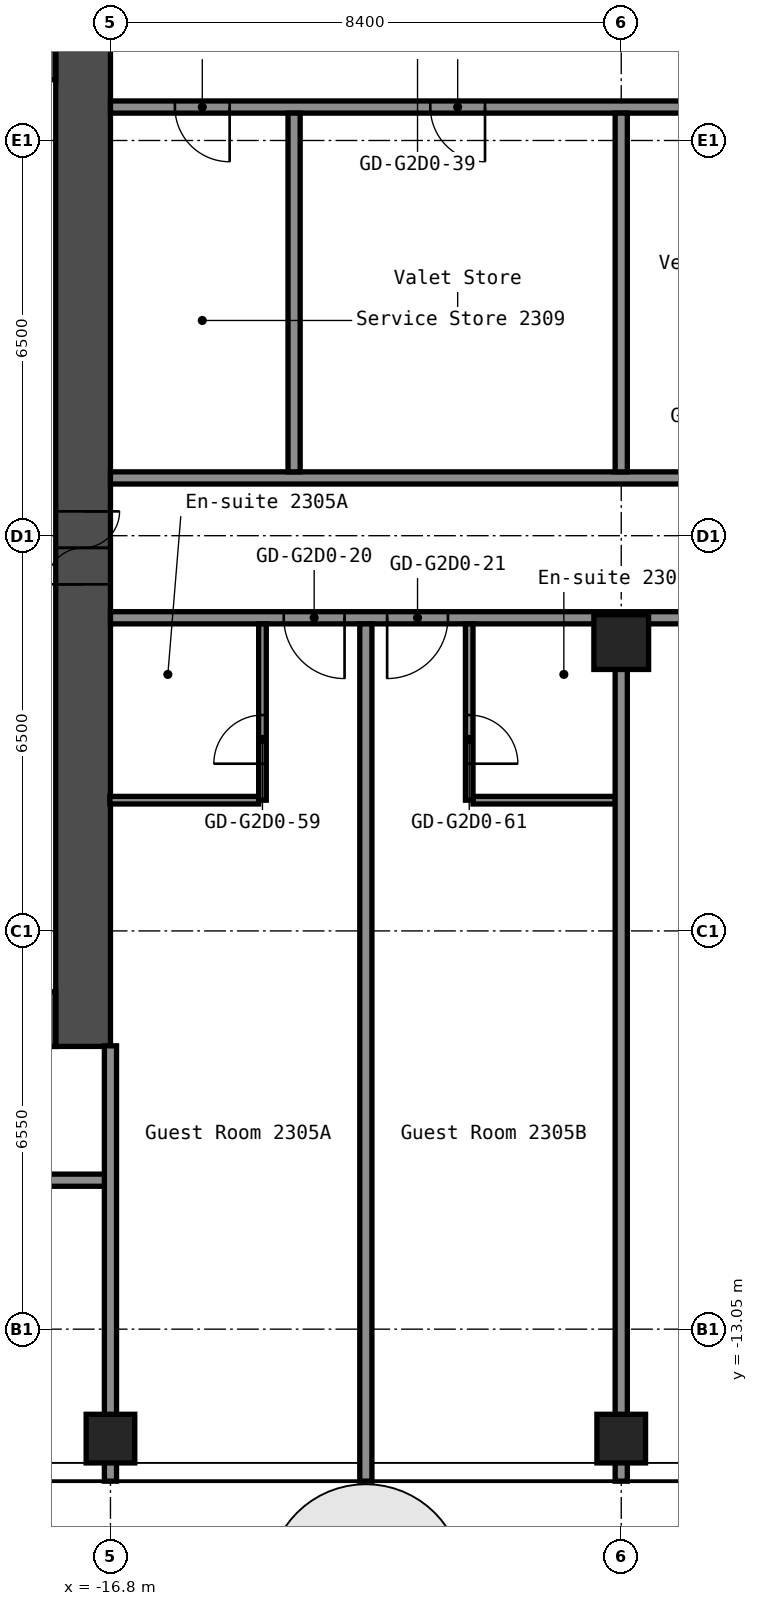
"""IFC4 building model, lengths in metres.
Left out: names, types, materials, properties, quantities, classifications, styles, units other than length and angle.
Written with IfcOpenShell. Run it as: python <this file> out.ifc"""

import sys

from ifc_helpers import new_model, si_unit, direction, frame, frame_2d, origin, origin_2d, place, context, subcontext, project, spatial, rectangle, hollow_rectangle, extrude, element, fill, save


model = new_model("IFC4")
c1 = context("Model", 3, precision=1e-05, world=origin(), true_north=direction((0.0, 1.0)))
c2 = subcontext(c1, "Body", "Model", "MODEL_VIEW")
j1 = project(units=[si_unit("LENGTHUNIT", "METRE"), si_unit("PLANEANGLEUNIT", "RADIAN")], contexts=[c1])
p1 = place(None, origin())
s1 = spatial("IfcSite", under=j1, at=p1, CompositionType="ELEMENT")
p2 = place(p1, origin())
s2 = spatial("IfcBuilding", under=s1, at=p2, CompositionType="ELEMENT")
p3 = place(p2, frame((0.0, 0.0, 85.0)))
s3 = spatial("IfcBuildingStorey", under=s2, at=p3, CompositionType="ELEMENT", Elevation=85.0)
for number, where, z_axis, x_axis in (
    (1, (-16.8, -14.85, 0.0), (0.0, 0.0, 1.0), (1.0, 0.0, 0.0)),
    (2, (-8.4, -14.85, 0.0), (0.0, 0.0, 1.0), (1.0, 0.0, 0.0)),
):
    element("IfcColumn", number, at=place(p3, frame(where, z_axis=z_axis, x_axis=x_axis)), inside=s3, PredefinedType="COLUMN", context=c2, shape_type="SweptSolid", body=[
        extrude(hollow_rectangle(XDim=0.8, YDim=0.8, WallThickness=0.032, at=origin_2d()), origin(), (0.0, 0.0, 1.0), 2.8),
    ])
p4 = place(p3, frame((-8.4, -1.75, 0.0), z_axis=(0.0, 0.0, 1.0), x_axis=(1.0, 0.0, 0.0)))
e3 = element("IfcColumn", 3, at=p4, inside=s3, PredefinedType="COLUMN", context=c2, shape_type="SweptSolid", body=[
    extrude(hollow_rectangle(XDim=0.9, YDim=0.9, WallThickness=0.036, at=origin_2d()), origin(), (0.0, 0.0, 1.0), 2.8),
])
p5 = place(p3, frame((-17.25, -8.4, 0.0), z_axis=(0.0, 0.0, 1.0), x_axis=(0.0, 1.0, 0.0)))
e4 = element("IfcWall", 4, at=p5, inside=s3, PredefinedType="SHEAR", context=c2, shape_type="SweptSolid", body=[
    extrude(rectangle(XDim=16.8, YDim=0.9, at=frame_2d((8.4, 0.0))), origin(), (0.0, 0.0, 1.0), 2.8),
])
p6 = place(p5, frame((7.6, 0.0, 0.0)))
e5 = element("IfcOpeningElement", 5, at=p6, cuts=e4, PredefinedType="OPENING", context=c2, shape_type="SweptSolid", body=[
    extrude(rectangle(XDim=1.2, YDim=2.1, at=frame_2d((0.6, 1.05))), frame((0.0, 0.46, 0.0), z_axis=(0.0, -1.0, 0.0), x_axis=(1.0, 0.0, 0.0)), (0.0, 0.0, 1.0), 0.92),
])
p7 = place(p3, frame((-32.7, 7.95, 0.0), z_axis=(0.0, 0.0, 1.0), x_axis=(1.0, 0.0, 0.0)))
e6 = element("IfcWall", 6, at=p7, inside=s3, PredefinedType="SHEAR", context=c2, shape_type="SweptSolid", body=[
    extrude(rectangle(XDim=15.0, YDim=0.9, at=frame_2d((7.5, 0.0))), origin(), (0.0, 0.0, 1.0), 2.8),
])
p8 = place(p7, frame((3.4, 0.0, 0.0)))
e7 = element("IfcOpeningElement", 7, at=p8, cuts=e6, PredefinedType="OPENING", context=c2, shape_type="SweptSolid", body=[
    extrude(rectangle(XDim=1.2, YDim=2.1, at=frame_2d((0.6, 1.05))), frame((0.0, 0.46, 0.0), z_axis=(0.0, -1.0, 0.0), x_axis=(1.0, 0.0, 0.0)), (0.0, 0.0, 1.0), 0.92),
])
p9 = place(p7, frame((0.75, 0.0, 0.0)))
e8 = element("IfcOpeningElement", 8, at=p9, cuts=e6, PredefinedType="OPENING", context=c2, shape_type="SweptSolid", body=[
    extrude(rectangle(XDim=0.9, YDim=2.1, at=frame_2d((0.45, 1.05))), frame((0.0, 0.46, 0.0), z_axis=(0.0, -1.0, 0.0), x_axis=(1.0, 0.0, 0.0)), (0.0, 0.0, 1.0), 0.92),
])
p10 = place(p3, frame((-32.7, -7.95, 0.0), z_axis=(0.0, 0.0, 1.0), x_axis=(1.0, 0.0, 0.0)))
e9 = element("IfcWall", 9, at=p10, inside=s3, PredefinedType="SHEAR", context=c2, shape_type="SweptSolid", body=[
    extrude(rectangle(XDim=15.0, YDim=0.9, at=frame_2d((7.5, 0.0))), origin(), (0.0, 0.0, 1.0), 2.8),
])
p11 = place(p10, frame((11.45, 0.0, 0.0)))
e10 = element("IfcOpeningElement", 10, at=p11, cuts=e9, PredefinedType="OPENING", context=c2, shape_type="SweptSolid", body=[
    extrude(rectangle(XDim=1.0, YDim=2.1, at=frame_2d((0.5, 1.05))), frame((0.0, 0.46, 0.0), z_axis=(0.0, -1.0, 0.0), x_axis=(1.0, 0.0, 0.0)), (0.0, 0.0, 1.0), 0.92),
])
p12 = place(p3, frame((-46.5, -10.6, 0.0), z_axis=(0.0, 0.0, 1.0), x_axis=(1.0, 0.0, 0.0)))
e11 = element("IfcWall", 11, at=p12, inside=s3, PredefinedType="PARTITIONING", context=c2, shape_type="SweptSolid", body=[
    extrude(rectangle(XDim=29.7, YDim=0.2, at=frame_2d((14.85, 0.0))), origin(), (0.0, 0.0, 1.0), 2.8),
])
p13 = place(p12, frame((1.95, 0.0, 0.0)))
e12 = element("IfcOpeningElement", 12, at=p13, cuts=e11, PredefinedType="OPENING", context=c2, shape_type="SweptSolid", body=[
    extrude(rectangle(XDim=0.9, YDim=2.1, at=frame_2d((0.45, 1.05))), frame((0.0, 0.11, 0.0), z_axis=(0.0, -1.0, 0.0), x_axis=(1.0, 0.0, 0.0)), (0.0, 0.0, 1.0), 0.22),
])
p14 = place(p12, frame((5.98, 0.0, 0.0)))
e13 = element("IfcOpeningElement", 13, at=p14, cuts=e11, PredefinedType="OPENING", context=c2, shape_type="SweptSolid", body=[
    extrude(rectangle(XDim=0.9, YDim=2.1, at=frame_2d((0.45, 1.05))), frame((0.0, 0.11, 0.0), z_axis=(0.0, -1.0, 0.0), x_axis=(1.0, 0.0, 0.0)), (0.0, 0.0, 1.0), 0.22),
])
p15 = place(p12, frame((10.18, 0.0, 0.0)))
e14 = element("IfcOpeningElement", 14, at=p15, cuts=e11, PredefinedType="OPENING", context=c2, shape_type="SweptSolid", body=[
    extrude(rectangle(XDim=0.9, YDim=2.1, at=frame_2d((0.45, 1.05))), frame((0.0, 0.11, 0.0), z_axis=(0.0, -1.0, 0.0), x_axis=(1.0, 0.0, 0.0)), (0.0, 0.0, 1.0), 0.22),
])
p16 = place(p12, frame((14.885, 0.0, 0.0)))
e15 = element("IfcOpeningElement", 15, at=p16, cuts=e11, PredefinedType="OPENING", context=c2, shape_type="SweptSolid", body=[
    extrude(rectangle(XDim=0.9, YDim=2.1, at=frame_2d((0.45, 1.05))), frame((0.0, 0.11, 0.0), z_axis=(0.0, -1.0, 0.0), x_axis=(1.0, 0.0, 0.0)), (0.0, 0.0, 1.0), 0.22),
])
p17 = place(p12, frame((19.085, 0.0, 0.0)))
e16 = element("IfcOpeningElement", 16, at=p17, cuts=e11, PredefinedType="OPENING", context=c2, shape_type="SweptSolid", body=[
    extrude(rectangle(XDim=0.9, YDim=2.1, at=frame_2d((0.45, 1.05))), frame((0.0, 0.11, 0.0), z_axis=(0.0, -1.0, 0.0), x_axis=(1.0, 0.0, 0.0)), (0.0, 0.0, 1.0), 0.22),
])
p18 = place(p12, frame((22.68, 0.0, 0.0)))
e17 = element("IfcOpeningElement", 17, at=p18, cuts=e11, PredefinedType="OPENING", context=c2, shape_type="SweptSolid", body=[
    extrude(rectangle(XDim=0.9, YDim=2.1, at=frame_2d((0.45, 1.05))), frame((0.0, 0.11, 0.0), z_axis=(0.0, -1.0, 0.0), x_axis=(1.0, 0.0, 0.0)), (0.0, 0.0, 1.0), 0.22),
])
p19 = place(p12, frame((26.88, 0.0, 0.0)))
e18 = element("IfcOpeningElement", 18, at=p19, cuts=e11, PredefinedType="OPENING", context=c2, shape_type="SweptSolid", body=[
    extrude(rectangle(XDim=0.9, YDim=2.1, at=frame_2d((0.45, 1.05))), frame((0.0, 0.11, 0.0), z_axis=(0.0, -1.0, 0.0), x_axis=(1.0, 0.0, 0.0)), (0.0, 0.0, 1.0), 0.22),
])
p20 = place(p3, frame((-16.81, -4.35, 0.0), z_axis=(0.0, 0.0, 1.0), x_axis=(1.0, 0.0, 0.0)))
e19 = element("IfcWall", 19, at=p20, inside=s3, PredefinedType="PARTITIONING", context=c2, shape_type="SweptSolid", body=[
    extrude(rectangle(XDim=2.448, YDim=0.125, at=frame_2d((1.224, 0.0))), origin(), (0.0, 0.0, 1.0), 2.8),
])
p21 = place(p3, frame((-10.837, -4.35, 0.0), z_axis=(0.0, 0.0, 1.0), x_axis=(1.0, 0.0, 0.0)))
e20 = element("IfcWall", 20, at=p21, inside=s3, PredefinedType="PARTITIONING", context=c2, shape_type="SweptSolid", body=[
    extrude(rectangle(XDim=2.337, YDim=0.125, at=frame_2d((1.169, 0.0))), origin(), (0.0, 0.0, 1.0), 2.8),
])
p22 = place(p3, frame((-16.8, -1.35, 0.0), z_axis=(0.0, 0.0, 1.0), x_axis=(1.0, 0.0, 0.0)))
e21 = element("IfcWall", 21, at=p22, inside=s3, PredefinedType="PARTITIONING", context=c2, shape_type="SweptSolid", body=[
    extrude(rectangle(XDim=33.6, YDim=0.2, at=frame_2d((16.8, 0.0))), origin(), (0.0, 0.0, 1.0), 2.8),
])
p23 = place(p22, frame((2.85, 0.0, 0.0)))
e22 = element("IfcOpeningElement", 22, at=p23, cuts=e21, PredefinedType="OPENING", context=c2, shape_type="SweptSolid", body=[
    extrude(rectangle(XDim=1.0, YDim=2.1, at=frame_2d((0.5, 1.05))), frame((0.0, 0.11, 0.0), z_axis=(0.0, -1.0, 0.0), x_axis=(1.0, 0.0, 0.0)), (0.0, 0.0, 1.0), 0.22),
])
p24 = place(p22, frame((4.55, 0.0, 0.0)))
e23 = element("IfcOpeningElement", 23, at=p24, cuts=e21, PredefinedType="OPENING", context=c2, shape_type="SweptSolid", body=[
    extrude(rectangle(XDim=1.0, YDim=2.1, at=frame_2d((0.5, 1.05))), frame((0.0, 0.11, 0.0), z_axis=(0.0, -1.0, 0.0), x_axis=(1.0, 0.0, 0.0)), (0.0, 0.0, 1.0), 0.22),
])
p25 = place(p22, frame((12.1, 0.0, 0.0)))
e24 = element("IfcOpeningElement", 24, at=p25, cuts=e21, PredefinedType="OPENING", context=c2, shape_type="SweptSolid", body=[
    extrude(rectangle(XDim=1.0, YDim=2.1, at=frame_2d((0.5, 1.05))), frame((0.0, 0.11, 0.0), z_axis=(0.0, -1.0, 0.0), x_axis=(1.0, 0.0, 0.0)), (0.0, 0.0, 1.0), 0.22),
])
p26 = place(p22, frame((19.65, 0.0, 0.0)))
e25 = element("IfcOpeningElement", 25, at=p26, cuts=e21, PredefinedType="OPENING", context=c2, shape_type="SweptSolid", body=[
    extrude(rectangle(XDim=1.0, YDim=2.1, at=frame_2d((0.5, 1.05))), frame((0.0, 0.11, 0.0), z_axis=(0.0, -1.0, 0.0), x_axis=(1.0, 0.0, 0.0)), (0.0, 0.0, 1.0), 0.22),
])
p27 = place(p22, frame((21.35, 0.0, 0.0)))
e26 = element("IfcOpeningElement", 26, at=p27, cuts=e21, PredefinedType="OPENING", context=c2, shape_type="SweptSolid", body=[
    extrude(rectangle(XDim=1.0, YDim=2.1, at=frame_2d((0.5, 1.05))), frame((0.0, 0.11, 0.0), z_axis=(0.0, -1.0, 0.0), x_axis=(1.0, 0.0, 0.0)), (0.0, 0.0, 1.0), 0.22),
])
p28 = place(p22, frame((30.6, 0.0, 0.0)))
e27 = element("IfcOpeningElement", 27, at=p28, cuts=e21, PredefinedType="OPENING", context=c2, shape_type="SweptSolid", body=[
    extrude(rectangle(XDim=1.0, YDim=2.1, at=frame_2d((0.5, 1.05))), frame((0.0, 0.11, 0.0), z_axis=(0.0, -1.0, 0.0), x_axis=(1.0, 0.0, 0.0)), (0.0, 0.0, 1.0), 0.22),
])
p29 = place(p3, frame((-16.8, 0.95, 0.0), z_axis=(0.0, 0.0, 1.0), x_axis=(1.0, 0.0, 0.0)))
e28 = element("IfcWall", 28, at=p29, inside=s3, PredefinedType="PARTITIONING", context=c2, shape_type="SweptSolid", body=[
    extrude(rectangle(XDim=33.6, YDim=0.2, at=frame_2d((16.8, 0.0))), origin(), (0.0, 0.0, 1.0), 2.8),
])
p30 = place(p29, frame((9.715, 0.0, 0.0)))
e29 = element("IfcOpeningElement", 29, at=p30, cuts=e28, PredefinedType="OPENING", context=c2, shape_type="SweptSolid", body=[
    extrude(rectangle(XDim=0.9, YDim=2.1, at=frame_2d((0.45, 1.05))), frame((0.0, 0.11, 0.0), z_axis=(0.0, -1.0, 0.0), x_axis=(1.0, 0.0, 0.0)), (0.0, 0.0, 1.0), 0.22),
])
p31 = place(p29, frame((13.915, 0.0, 0.0)))
e30 = element("IfcOpeningElement", 30, at=p31, cuts=e28, PredefinedType="OPENING", context=c2, shape_type="SweptSolid", body=[
    extrude(rectangle(XDim=0.9, YDim=2.1, at=frame_2d((0.45, 1.05))), frame((0.0, 0.11, 0.0), z_axis=(0.0, -1.0, 0.0), x_axis=(1.0, 0.0, 0.0)), (0.0, 0.0, 1.0), 0.22),
])
p32 = place(p29, frame((26.345, 0.0, 0.0)))
e31 = element("IfcOpeningElement", 31, at=p32, cuts=e28, PredefinedType="OPENING", context=c2, shape_type="SweptSolid", body=[
    extrude(rectangle(XDim=0.9, YDim=2.1, at=frame_2d((0.45, 1.05))), frame((0.0, 0.11, 0.0), z_axis=(0.0, -1.0, 0.0), x_axis=(1.0, 0.0, 0.0)), (0.0, 0.0, 1.0), 0.22),
])
p33 = place(p29, frame((30.545, 0.0, 0.0)))
e32 = element("IfcOpeningElement", 32, at=p33, cuts=e28, PredefinedType="OPENING", context=c2, shape_type="SweptSolid", body=[
    extrude(rectangle(XDim=0.9, YDim=2.1, at=frame_2d((0.45, 1.05))), frame((0.0, 0.11, 0.0), z_axis=(0.0, -1.0, 0.0), x_axis=(1.0, 0.0, 0.0)), (0.0, 0.0, 1.0), 0.22),
])
p34 = place(p3, frame((-16.8, 7.05, 0.0), z_axis=(0.0, 0.0, 1.0), x_axis=(1.0, 0.0, 0.0)))
e33 = element("IfcWall", 33, at=p34, inside=s3, PredefinedType="PARTITIONING", context=c2, shape_type="SweptSolid", body=[
    extrude(rectangle(XDim=33.6, YDim=0.2, at=frame_2d((16.8, 0.0))), origin(), (0.0, 0.0, 1.0), 2.8),
])
p35 = place(p34, frame((1.06, 0.0, 0.0)))
e34 = element("IfcOpeningElement", 34, at=p35, cuts=e33, PredefinedType="OPENING", context=c2, shape_type="SweptSolid", body=[
    extrude(rectangle(XDim=0.9, YDim=2.1, at=frame_2d((0.45, 1.05))), frame((0.0, 0.11, 0.0), z_axis=(0.0, -1.0, 0.0), x_axis=(1.0, 0.0, 0.0)), (0.0, 0.0, 1.0), 0.22),
])
p36 = place(p34, frame((5.26, 0.0, 0.0)))
e35 = element("IfcOpeningElement", 35, at=p36, cuts=e33, PredefinedType="OPENING", context=c2, shape_type="SweptSolid", body=[
    extrude(rectangle(XDim=0.9, YDim=2.1, at=frame_2d((0.45, 1.05))), frame((0.0, 0.11, 0.0), z_axis=(0.0, -1.0, 0.0), x_axis=(1.0, 0.0, 0.0)), (0.0, 0.0, 1.0), 0.22),
])
p37 = place(p34, frame((19.04, 0.0, 0.0)))
e36 = element("IfcOpeningElement", 36, at=p37, cuts=e33, PredefinedType="OPENING", context=c2, shape_type="SweptSolid", body=[
    extrude(rectangle(XDim=0.9, YDim=2.1, at=frame_2d((0.45, 1.05))), frame((0.0, 0.11, 0.0), z_axis=(0.0, -1.0, 0.0), x_axis=(1.0, 0.0, 0.0)), (0.0, 0.0, 1.0), 0.22),
])
p38 = place(p34, frame((23.24, 0.0, 0.0)))
e37 = element("IfcOpeningElement", 37, at=p38, cuts=e33, PredefinedType="OPENING", context=c2, shape_type="SweptSolid", body=[
    extrude(rectangle(XDim=0.9, YDim=2.1, at=frame_2d((0.45, 1.05))), frame((0.0, 0.11, 0.0), z_axis=(0.0, -1.0, 0.0), x_axis=(1.0, 0.0, 0.0)), (0.0, 0.0, 1.0), 0.22),
])
p39 = place(p3, frame((-16.8, -15.55, 0.0), z_axis=(0.0, 0.0, 1.0), x_axis=(0.0, 1.0, 0.0)))
e38 = element("IfcWall", 38, at=p39, inside=s3, PredefinedType="PARTITIONING", context=c2, shape_type="SweptSolid", body=[
    extrude(rectangle(XDim=7.16, YDim=0.2, at=frame_2d((3.58, 0.0))), origin(), (0.0, 0.0, 1.0), 2.8),
])
p40 = place(p3, frame((-14.3, -4.35, 0.0), z_axis=(0.0, 0.0, 1.0), x_axis=(0.0, 1.0, 0.0)))
e39 = element("IfcWall", 39, at=p40, inside=s3, PredefinedType="PARTITIONING", context=c2, shape_type="SweptSolid", body=[
    extrude(rectangle(XDim=2.9, YDim=0.125, at=frame_2d((1.45, 0.0))), origin(), (0.0, 0.0, 1.0), 2.8),
])
p41 = place(p40, frame((0.6, 0.0, 0.0)))
e40 = element("IfcOpeningElement", 40, at=p41, cuts=e39, PredefinedType="OPENING", context=c2, shape_type="SweptSolid", body=[
    extrude(rectangle(XDim=0.8, YDim=2.1, at=frame_2d((0.4, 1.05))), frame((0.0, 0.073, 0.0), z_axis=(0.0, -1.0, 0.0), x_axis=(1.0, 0.0, 0.0)), (0.0, 0.0, 1.0), 0.145),
])
p42 = place(p3, frame((-13.78, 1.05, 0.0), z_axis=(0.0, 0.0, 1.0), x_axis=(0.0, 1.0, 0.0)))
e41 = element("IfcWall", 41, at=p42, inside=s3, PredefinedType="PARTITIONING", context=c2, shape_type="SweptSolid", body=[
    extrude(rectangle(XDim=5.9, YDim=0.2, at=frame_2d((2.95, 0.0))), origin(), (0.0, 0.0, 1.0), 2.8),
])
p43 = place(p3, frame((-12.6, -15.55, 0.0), z_axis=(0.0, 0.0, 1.0), x_axis=(0.0, 1.0, 0.0)))
e42 = element("IfcWall", 42, at=p43, inside=s3, PredefinedType="PARTITIONING", context=c2, shape_type="SweptSolid", body=[
    extrude(rectangle(XDim=14.1, YDim=0.2, at=frame_2d((7.05, 0.0))), origin(), (0.0, 0.0, 1.0), 2.8),
])
p44 = place(p3, frame((-10.9, -4.35, 0.0), z_axis=(0.0, 0.0, 1.0), x_axis=(0.0, 1.0, 0.0)))
e43 = element("IfcWall", 43, at=p44, inside=s3, PredefinedType="PARTITIONING", context=c2, shape_type="SweptSolid", body=[
    extrude(rectangle(XDim=2.9, YDim=0.125, at=frame_2d((1.45, 0.0))), origin(), (0.0, 0.0, 1.0), 2.8),
])
p45 = place(p44, frame((0.6, 0.0, 0.0)))
e44 = element("IfcOpeningElement", 44, at=p45, cuts=e43, PredefinedType="OPENING", context=c2, shape_type="SweptSolid", body=[
    extrude(rectangle(XDim=0.8, YDim=2.1, at=frame_2d((0.4, 1.05))), frame((0.0, 0.073, 0.0), z_axis=(0.0, -1.0, 0.0), x_axis=(1.0, 0.0, 0.0)), (0.0, 0.0, 1.0), 0.145),
])
p46 = place(p3, frame((-8.4, -15.55, 0.0), z_axis=(0.0, 0.0, 1.0), x_axis=(0.0, 1.0, 0.0)))
e45 = element("IfcWall", 45, at=p46, inside=s3, PredefinedType="PARTITIONING", context=c2, shape_type="SweptSolid", body=[
    extrude(rectangle(XDim=13.36, YDim=0.2, at=frame_2d((6.68, 0.0))), origin(), (0.0, 0.0, 1.0), 2.8),
])
p47 = place(p3, frame((-8.4, 1.05, 0.0), z_axis=(0.0, 0.0, 1.0), x_axis=(0.0, 1.0, 0.0)))
e46 = element("IfcWall", 46, at=p47, inside=s3, PredefinedType="PARTITIONING", context=c2, shape_type="SweptSolid", body=[
    extrude(rectangle(XDim=5.9, YDim=0.2, at=frame_2d((2.95, 0.0))), origin(), (0.0, 0.0, 1.0), 2.8),
])
p48 = place(p6, origin())
e47 = element("IfcDoor", 47, at=p48, inside=s3, OperationType="DOUBLE_DOOR_SINGLE_SWING", PredefinedType="DOOR", context=c2, shape_type="SweptSolid", body=[
    extrude(rectangle(XDim=1.2, YDim=2.1, at=frame_2d((0.6, 1.05))), frame((0.0, 0.025, 0.0), z_axis=(0.0, -1.0, 0.0), x_axis=(1.0, 0.0, 0.0)), (0.0, 0.0, 1.0), 0.05),
])
fill(e5, e47)
p49 = place(p23, origin())
e48 = element("IfcDoor", 48, at=p49, inside=s3, OperationType="SINGLE_SWING_RIGHT", PredefinedType="DOOR", context=c2, shape_type="SweptSolid", body=[
    extrude(rectangle(XDim=1.0, YDim=2.1, at=frame_2d((0.5, 1.05))), frame((0.0, 0.025, 0.0), z_axis=(0.0, -1.0, 0.0), x_axis=(1.0, 0.0, 0.0)), (0.0, 0.0, 1.0), 0.05),
])
fill(e22, e48)
p50 = place(p24, origin())
e49 = element("IfcDoor", 49, at=p50, inside=s3, OperationType="SINGLE_SWING_LEFT", PredefinedType="DOOR", context=c2, shape_type="SweptSolid", body=[
    extrude(rectangle(XDim=1.0, YDim=2.1, at=frame_2d((0.5, 1.05))), frame((0.0, 0.025, 0.0), z_axis=(0.0, -1.0, 0.0), x_axis=(1.0, 0.0, 0.0)), (0.0, 0.0, 1.0), 0.05),
])
fill(e23, e49)
p51 = place(p35, origin())
e50 = element("IfcDoor", 50, at=p51, inside=s3, OperationType="SINGLE_SWING_RIGHT", PredefinedType="DOOR", context=c2, shape_type="SweptSolid", body=[
    extrude(rectangle(XDim=0.9, YDim=2.1, at=frame_2d((0.45, 1.05))), frame((0.0, 0.025, 0.0), z_axis=(0.0, -1.0, 0.0), x_axis=(1.0, 0.0, 0.0)), (0.0, 0.0, 1.0), 0.05),
])
fill(e34, e50)
p52 = place(p36, origin())
e51 = element("IfcDoor", 51, at=p52, inside=s3, OperationType="SINGLE_SWING_RIGHT", PredefinedType="DOOR", context=c2, shape_type="SweptSolid", body=[
    extrude(rectangle(XDim=0.9, YDim=2.1, at=frame_2d((0.45, 1.05))), frame((0.0, 0.025, 0.0), z_axis=(0.0, -1.0, 0.0), x_axis=(1.0, 0.0, 0.0)), (0.0, 0.0, 1.0), 0.05),
])
fill(e35, e51)
p53 = place(p41, origin())
e52 = element("IfcDoor", 52, at=p53, inside=s3, OperationType="SINGLE_SWING_RIGHT", PredefinedType="DOOR", context=c2, shape_type="SweptSolid", body=[
    extrude(rectangle(XDim=0.8, YDim=2.1, at=frame_2d((0.4, 1.05))), frame((0.0, 0.025, 0.0), z_axis=(0.0, -1.0, 0.0), x_axis=(1.0, 0.0, 0.0)), (0.0, 0.0, 1.0), 0.05),
])
fill(e40, e52)
p54 = place(p45, origin())
e53 = element("IfcDoor", 53, at=p54, inside=s3, OperationType="SINGLE_SWING_LEFT", PredefinedType="DOOR", context=c2, shape_type="SweptSolid", body=[
    extrude(rectangle(XDim=0.8, YDim=2.1, at=frame_2d((0.4, 1.05))), frame((0.0, 0.025, 0.0), z_axis=(0.0, -1.0, 0.0), x_axis=(1.0, 0.0, 0.0)), (0.0, 0.0, 1.0), 0.05),
])
fill(e44, e53)
save(model, sys.argv[1])
